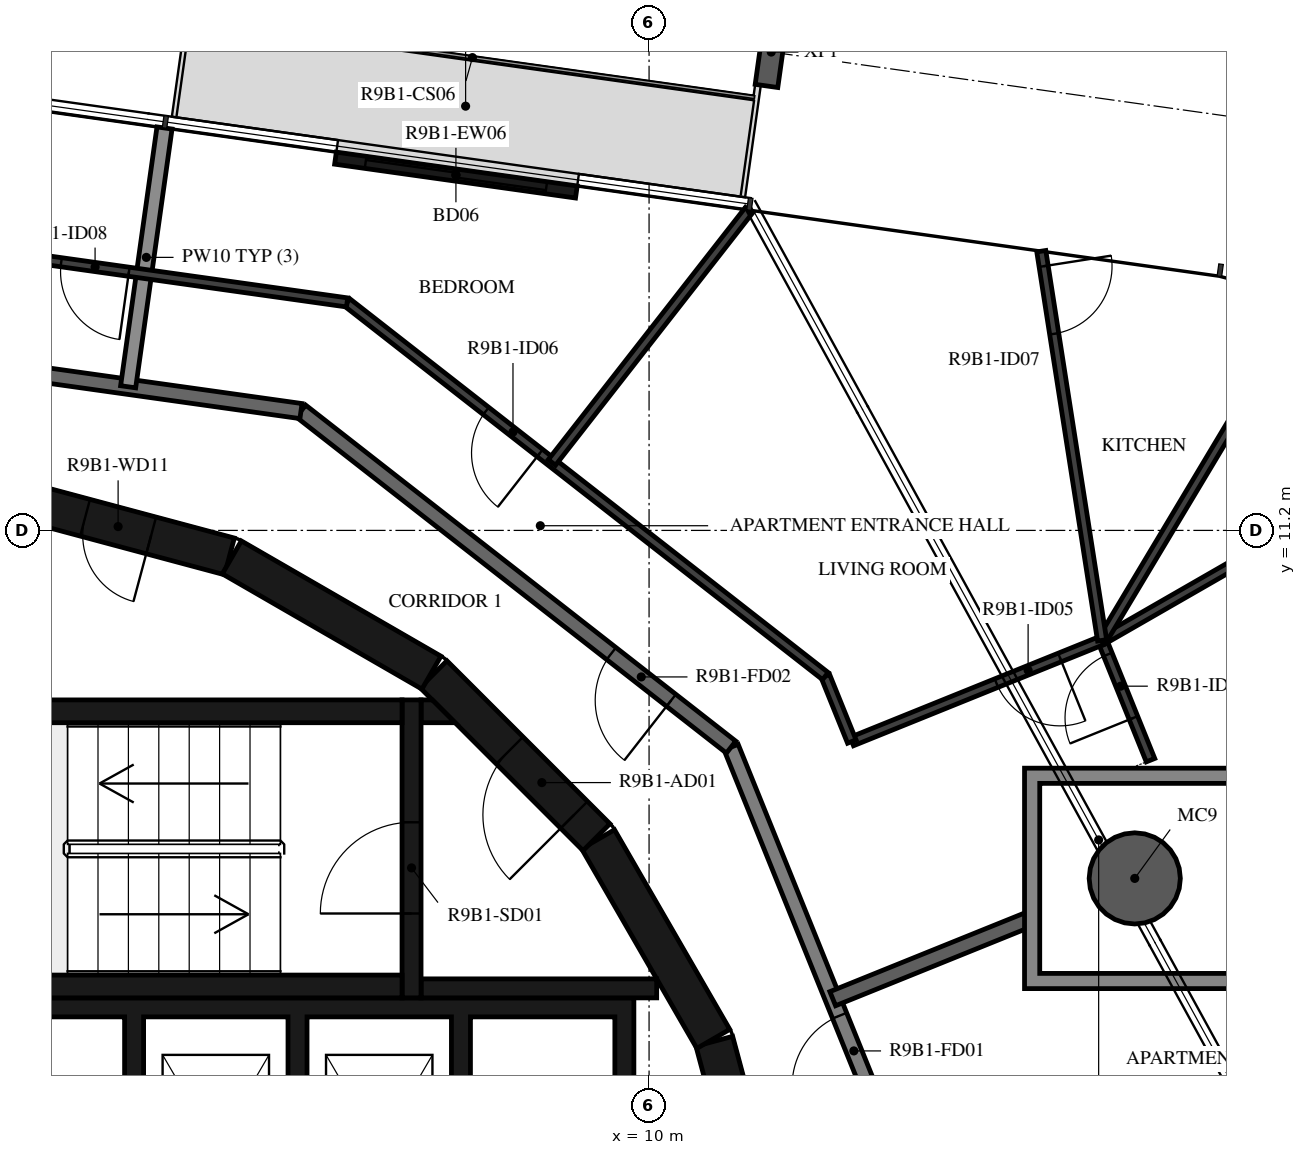
"""IFC4 building model, lengths in metres.
Left out: names, types, materials, properties, quantities, classifications, styles, units other than length and angle.
Written with IfcOpenShell. Run it as: python <this file> out.ifc"""

import sys

from ifc_helpers import new_model, si_unit, direction, frame, frame_2d, origin, origin_2d, place, context, subcontext, project, spatial, polyline, rectangle, hollow_circle, i_section, outline, extrude, element, fill, save


model = new_model("IFC4")
c1 = context("Model", 3, precision=1e-05, world=origin(), true_north=direction((0.0, 1.0)))
c2 = subcontext(c1, "Body", "Model", "MODEL_VIEW")
j1 = project(units=[si_unit("LENGTHUNIT", "METRE"), si_unit("PLANEANGLEUNIT", "RADIAN")], contexts=[c1])
p1 = place(None, origin())
s1 = spatial("IfcSite", under=j1, at=p1, CompositionType="ELEMENT")
p2 = place(p1, origin())
s2 = spatial("IfcBuilding", under=s1, at=p2, CompositionType="ELEMENT")
p3 = place(p2, frame((0.0, 0.0, 343.5)))
s3 = spatial("IfcBuildingStorey", under=s2, at=p3, CompositionType="ELEMENT", Elevation=343.5)
p4 = place(p3, frame((16.39, 6.622, -0.38), z_axis=(0.0, 0.0, 1.0), x_axis=(1.0, 0.0, 0.0)))
e1 = element("IfcColumn", 1, at=p4, inside=s3, PredefinedType="COLUMN", context=c2, shape_type="SweptSolid", body=[
    extrude(hollow_circle(Radius=0.6, WallThickness=0.03, at=origin_2d()), origin(), (0.0, 0.0, 1.0), 3.5),
])
p5 = place(p3, frame((11.607, 17.493, -0.38), z_axis=(0.0, 0.0, 1.0), x_axis=(0.990268081324, -0.139173011432, 0.0)))
e2 = element("IfcColumn", 2, at=p5, inside=s3, PredefinedType="COLUMN", context=c2, shape_type="SweptSolid", body=[
    extrude(i_section(OverallWidth=0.3, OverallDepth=0.9, WebThickness=0.019, FlangeThickness=0.035, FilletRadius=0.03, at=origin_2d()), origin(), (0.0, 0.0, 1.0), 3.5),
])
p6 = place(p3, frame((9.043, 15.652, 0.0), z_axis=(0.0, 0.0, 1.0), x_axis=(-0.990270382149, 0.139156639217, 0.0)))
e3 = element("IfcWall", 3, at=p6, inside=s3, PredefinedType="STANDARD", context=c2, shape_type="SweptSolid", body=[
    extrude(rectangle(XDim=3.2, YDim=0.16, at=frame_2d((1.6, 0.0))), origin(), (0.0, 0.0, 1.0), 3.12),
])
p7 = place(p6, frame((0.4, 0.0, 0.0)))
e4 = element("IfcOpeningElement", 4, at=p7, cuts=e3, PredefinedType="OPENING", context=c2, shape_type="SweptSolid", body=[
    extrude(rectangle(XDim=2.4, YDim=2.4, at=frame_2d((1.2, 1.2))), frame((0.0, 0.09, 0.0), z_axis=(0.0, -1.0, 0.0), x_axis=(1.0, 0.0, 0.0)), (0.0, 0.0, 1.0), 0.18),
])
for number, where, z_axis, x_axis in (
    (5, (11.643, 1.55, 0.0), (0.0, 0.0, 1.0), (-0.259, 0.966, 0.0)),
    (6, (10.845, 4.51, 0.0), (0.0, 0.0, 1.0), (-0.5, 0.866, 0.0)),
):
    element("IfcWall", number, at=place(p3, frame(where, z_axis=z_axis, x_axis=x_axis)), inside=s3, PredefinedType="SHEAR", context=c2, shape_type="SweptSolid", body=[
        extrude(rectangle(XDim=3.033, YDim=0.5, at=frame_2d((1.516, 0.0))), origin(), (0.0, 0.0, 1.0), 3.12),
    ])
p8 = place(p3, frame((9.308, 7.164, 0.0), z_axis=(0.0, 0.0, 1.0), x_axis=(-0.707106781187, 0.707106781187, 0.0)))
e7 = element("IfcWall", 7, at=p8, inside=s3, PredefinedType="SHEAR", context=c2, shape_type="SweptSolid", body=[
    extrude(rectangle(XDim=3.032, YDim=0.5, at=frame_2d((1.516, 0.0))), origin(), (0.0, 0.0, 1.0), 3.12),
])
p9 = place(p8, frame((0.416, 0.0, 0.0)))
e8 = element("IfcOpeningElement", 8, at=p9, cuts=e7, PredefinedType="OPENING", context=c2, shape_type="SweptSolid", body=[
    extrude(rectangle(XDim=1.2, YDim=2.1, at=frame_2d((0.6, 1.05))), frame((0.0, 0.26, 0.0), z_axis=(0.0, -1.0, 0.0), x_axis=(1.0, 0.0, 0.0)), (0.0, 0.0, 1.0), 0.52),
])
p10 = place(p3, frame((7.137, 9.329, 0.0), z_axis=(0.0, 0.0, 1.0), x_axis=(-0.865975092491, 0.500087131594, 0.0)))
e9 = element("IfcWall", 9, at=p10, inside=s3, PredefinedType="SHEAR", context=c2, shape_type="SweptSolid", body=[
    extrude(rectangle(XDim=3.033, YDim=0.5, at=frame_2d((1.516, 0.0))), origin(), (0.0, 0.0, 1.0), 3.12),
])
p11 = place(p3, frame((4.479, 10.858, 0.0), z_axis=(0.0, 0.0, 1.0), x_axis=(-0.965948410781, 0.258734743916, 0.0)))
e10 = element("IfcWall", 10, at=p11, inside=s3, PredefinedType="SHEAR", context=c2, shape_type="SweptSolid", body=[
    extrude(rectangle(XDim=3.033, YDim=0.5, at=frame_2d((1.516, 0.0))), origin(), (0.0, 0.0, 1.0), 3.12),
])
p12 = place(p11, frame((1.066, 0.0, 0.0)))
e11 = element("IfcOpeningElement", 11, at=p12, cuts=e10, PredefinedType="OPENING", context=c2, shape_type="SweptSolid", body=[
    extrude(rectangle(XDim=0.9, YDim=2.1, at=frame_2d((0.45, 1.05))), frame((0.0, 0.26, 0.0), z_axis=(0.0, -1.0, 0.0), x_axis=(1.0, 0.0, 0.0)), (0.0, 0.0, 1.0), 0.52),
])
for number, where, z_axis, x_axis in (
    (12, (0.0, 5.2, 0.0), (0.0, 0.0, 1.0), (1.0, 0.0, 0.0)),
    (13, (0.0, 8.82, 0.0), (0.0, 0.0, 1.0), (1.0, 0.0, 0.0)),
):
    element("IfcWall", number, at=place(p3, frame(where, z_axis=z_axis, x_axis=x_axis)), inside=s3, PredefinedType="SHEAR", context=c2, shape_type="SweptSolid", body=[
        extrude(rectangle(XDim=6.75, YDim=0.3, at=frame_2d((3.375, 0.0))), origin(), (0.0, 0.0, 1.0), 3.12),
    ])
p13 = place(p3, frame((6.875, 5.05, 0.0), z_axis=(0.0, 0.0, 1.0), x_axis=(0.0, 1.0, 0.0)))
e14 = element("IfcWall", 14, at=p13, inside=s3, PredefinedType="SHEAR", context=c2, shape_type="SweptSolid", body=[
    extrude(rectangle(XDim=3.92, YDim=0.25, at=frame_2d((1.96, 0.0))), origin(), (0.0, 0.0, 1.0), 3.12),
])
p14 = place(p13, frame((1.11, 0.0, 0.0)))
e15 = element("IfcOpeningElement", 15, at=p14, cuts=e14, PredefinedType="OPENING", context=c2, shape_type="SweptSolid", body=[
    extrude(rectangle(XDim=1.2, YDim=2.1, at=frame_2d((0.6, 1.05))), frame((0.0, 0.135, 0.0), z_axis=(0.0, -1.0, 0.0), x_axis=(1.0, 0.0, 0.0)), (0.0, 0.0, 1.0), 0.27),
])
p15 = place(p3, frame((7.0, 5.175, 0.0), z_axis=(0.0, 0.0, 1.0), x_axis=(1.0, 0.0, 0.0)))
e16 = element("IfcWall", 16, at=p15, inside=s3, PredefinedType="SHEAR", context=c2, shape_type="SweptSolid", body=[
    extrude(rectangle(XDim=3.1, YDim=0.25, at=frame_2d((1.55, 0.0))), origin(), (0.0, 0.0, 1.0), 3.12),
])
p16 = place(p3, origin())
e17 = element("IfcWall", 17, at=p16, inside=s3, PredefinedType="SHEAR", context=c2, shape_type="SweptSolid", body=[
    extrude(outline(polyline([(7.448, 8.67), (7.0, 8.67), (7.0, 8.97), (7.148, 8.97), (7.448, 8.67)])), origin(), (0.0, 0.0, 1.0), 3.12),
])
p17 = place(p3, origin())
e18 = element("IfcWall", 18, at=p17, inside=s3, PredefinedType="SHEAR", context=c2, shape_type="SweptSolid", body=[
    extrude(outline(polyline([(-9.8, 1.9), (-9.55, 1.9), (-9.55, 4.8), (-1.2, 4.8), (-1.2, 1.9), (-0.95, 1.9), (-0.95, 4.8), (3.1, 4.8), (3.1, 1.9), (3.35, 1.9), (3.35, 4.8), (5.25, 4.8), (5.25, 1.9), (5.5, 1.9), (5.5, 4.8), (7.4, 4.8), (7.4, 1.9), (7.65, 1.9), (7.65, 4.8), (9.55, 4.8), (9.55, 1.9), (9.8, 1.9), (9.8, 4.8), (9.8, 5.05), (-9.8, 5.05), (-9.8, 4.8), (-9.8, 1.9)])), origin(), (0.0, 0.0, 1.0), 3.12),
])
p18 = place(p3, frame((13.769, 1.691, 0.0), z_axis=(0.0, 0.0, 1.0), x_axis=(-0.374618189599, 0.92717916932, 0.0)))
e19 = element("IfcWall", 19, at=p18, inside=s3, PredefinedType="STANDARD", context=c2, shape_type="SweptSolid", body=[
    extrude(rectangle(XDim=7.181, YDim=0.2, at=frame_2d((3.591, 0.0))), origin(), (0.0, 0.0, 1.0), 3.12),
])
p19 = place(p18, frame((2.371, 0.0, 0.0)))
e20 = element("IfcOpeningElement", 20, at=p19, cuts=e19, PredefinedType="OPENING", context=c2, shape_type="SweptSolid", body=[
    extrude(rectangle(XDim=1.0, YDim=2.1, at=frame_2d((0.5, 1.05))), frame((0.0, 0.11, 0.0), z_axis=(0.0, -1.0, 0.0), x_axis=(1.0, 0.0, 0.0)), (0.0, 0.0, 1.0), 0.22),
])
p20 = place(p3, frame((11.079, 8.349, 0.0), z_axis=(0.0, 0.0, 1.0), x_axis=(-0.78800478687, 0.615669112324, 0.0)))
e21 = element("IfcWall", 21, at=p20, inside=s3, PredefinedType="STANDARD", context=c2, shape_type="SweptSolid", body=[
    extrude(rectangle(XDim=7.181, YDim=0.2, at=frame_2d((3.591, 0.0))), origin(), (0.0, 0.0, 1.0), 3.12),
])
p21 = place(p20, frame((1.0, 0.0, 0.0)))
e22 = element("IfcOpeningElement", 22, at=p21, cuts=e21, PredefinedType="OPENING", context=c2, shape_type="SweptSolid", body=[
    extrude(rectangle(XDim=1.0, YDim=2.1, at=frame_2d((0.5, 1.05))), frame((0.0, 0.11, 0.0), z_axis=(0.0, -1.0, 0.0), x_axis=(1.0, 0.0, 0.0)), (0.0, 0.0, 1.0), 0.22),
])
p22 = place(p3, frame((5.42, 12.77, 0.0), z_axis=(0.0, 0.0, 1.0), x_axis=(-0.990270565508, 0.139155334385, 0.0)))
e23 = element("IfcWall", 23, at=p22, inside=s3, PredefinedType="STANDARD", context=c2, shape_type="SweptSolid", body=[
    extrude(rectangle(XDim=7.181, YDim=0.2, at=frame_2d((3.59, 0.0))), origin(), (0.0, 0.0, 1.0), 3.12),
])
p23 = place(p3, frame((14.989, 6.079, 0.0), z_axis=(0.0, 0.0, 1.0), x_axis=(-0.927203056473, -0.374559063523, 0.0)))
e24 = element("IfcWall", 24, at=p23, inside=s3, PredefinedType="STANDARD", context=c2, shape_type="SweptSolid", body=[
    extrude(rectangle(XDim=2.775, YDim=0.2, at=frame_2d((1.387, 0.0))), origin(), (0.0, 0.0, 1.0), 3.12),
])
p24 = place(p3, frame((3.625, 16.494, 0.0), z_axis=(0.0, 0.0, 1.0), x_axis=(-0.139174320859, -0.990267897295, 0.0)))
e25 = element("IfcWall", 25, at=p24, inside=s3, PredefinedType="STANDARD", context=c2, shape_type="SweptSolid", body=[
    extrude(rectangle(XDim=3.438, YDim=0.2, at=frame_2d((1.719, 0.0))), origin(), (0.0, 0.0, 1.0), 2.73),
])
p25 = place(p3, frame((16.597, 8.177, 0.0), z_axis=(0.0, 0.0, 1.0), x_axis=(-0.374631609957, 0.927173746835, 0.0)))
e26 = element("IfcWall", 26, at=p25, inside=s3, PredefinedType="PARTITIONING", context=c2, shape_type="SweptSolid", body=[
    extrude(rectangle(XDim=1.7, YDim=0.12, at=frame_2d((0.85, 0.0))), origin(), (0.0, 0.0, 1.0), 3.12),
])
p26 = place(p25, frame((0.6, 0.0, 0.0)))
e27 = element("IfcOpeningElement", 27, at=p26, cuts=e26, PredefinedType="OPENING", context=c2, shape_type="SweptSolid", body=[
    extrude(rectangle(XDim=0.9, YDim=2.1, at=frame_2d((0.45, 1.05))), frame((0.0, 0.07, 0.0), z_axis=(0.0, -1.0, 0.0), x_axis=(1.0, 0.0, 0.0)), (0.0, 0.0, 1.0), 0.14),
])
p27 = place(p3, frame((15.96, 9.753, 0.0), z_axis=(0.0, 0.0, 1.0), x_axis=(-0.927148174805, -0.37469489182, 0.0)))
e28 = element("IfcWall", 28, at=p27, inside=s3, PredefinedType="PARTITIONING", context=c2, shape_type="SweptSolid", body=[
    extrude(rectangle(XDim=3.552, YDim=0.12, at=frame_2d((1.776, 0.0))), origin(), (0.0, 0.0, 1.0), 3.12),
])
p28 = place(p27, frame((0.6, 0.0, 0.0)))
e29 = element("IfcOpeningElement", 29, at=p28, cuts=e28, PredefinedType="OPENING", context=c2, shape_type="SweptSolid", body=[
    extrude(rectangle(XDim=0.9, YDim=2.1, at=frame_2d((0.45, 1.05))), frame((0.0, 0.07, 0.0), z_axis=(0.0, -1.0, 0.0), x_axis=(1.0, 0.0, 0.0)), (0.0, 0.0, 1.0), 0.14),
])
p29 = place(p3, frame((12.667, 8.423, 0.0), z_axis=(0.0, 0.0, 1.0), x_axis=(-0.374697807675, 0.927146996395, 0.0)))
e30 = element("IfcWall", 30, at=p29, inside=s3, PredefinedType="PARTITIONING", context=c2, shape_type="SweptSolid", body=[
    extrude(rectangle(XDim=0.928, YDim=0.12, at=frame_2d((0.464, 0.0))), origin(), (0.0, 0.0, 1.0), 3.12),
])
p30 = place(p3, frame((12.319, 9.283, 0.0), z_axis=(0.0, 0.0, 1.0), x_axis=(-0.788000268464, 0.61567489546, 0.0)))
e31 = element("IfcWall", 31, at=p30, inside=s3, PredefinedType="PARTITIONING", context=c2, shape_type="SweptSolid", body=[
    extrude(rectangle(XDim=7.985, YDim=0.12, at=frame_2d((3.992, 0.0))), origin(), (0.0, 0.0, 1.0), 3.12),
])
p31 = place(p30, frame((4.765, 0.0, 0.0)))
e32 = element("IfcOpeningElement", 32, at=p31, cuts=e31, PredefinedType="OPENING", context=c2, shape_type="SweptSolid", body=[
    extrude(rectangle(XDim=0.9, YDim=2.1, at=frame_2d((0.45, 1.05))), frame((0.0, 0.07, 0.0), z_axis=(0.0, -1.0, 0.0), x_axis=(1.0, 0.0, 0.0)), (0.0, 0.0, 1.0), 0.14),
])
p32 = place(p3, frame((6.027, 14.199, 0.0), z_axis=(0.0, 0.0, 1.0), x_axis=(-0.990271593532, 0.139148018469, 0.0)))
e33 = element("IfcWall", 33, at=p32, inside=s3, PredefinedType="PARTITIONING", context=c2, shape_type="SweptSolid", body=[
    extrude(rectangle(XDim=7.985, YDim=0.12, at=frame_2d((3.992, 0.0))), origin(), (0.0, 0.0, 1.0), 3.12),
])
p33 = place(p32, frame((2.898, 0.0, 0.0)))
e34 = element("IfcOpeningElement", 34, at=p33, cuts=e33, PredefinedType="OPENING", context=c2, shape_type="SweptSolid", body=[
    extrude(rectangle(XDim=0.9, YDim=2.1, at=frame_2d((0.45, 1.05))), frame((0.0, 0.07, 0.0), z_axis=(0.0, -1.0, 0.0), x_axis=(1.0, 0.0, 0.0)), (0.0, 0.0, 1.0), 0.14),
])
p34 = place(p3, frame((21.343, 12.847, 0.0), z_axis=(0.0, 0.0, 1.0), x_axis=(-0.866974691568, -0.498352168832, 0.0)))
e35 = element("IfcWall", 35, at=p34, inside=s3, PredefinedType="PARTITIONING", context=c2, shape_type="SweptSolid", body=[
    extrude(rectangle(XDim=6.208, YDim=0.12, at=frame_2d((3.104, 0.0))), origin(), (0.0, 0.0, 1.0), 3.12),
])
p35 = place(p3, frame((18.649, 14.244, 0.0), z_axis=(0.0, 0.0, 1.0), x_axis=(-0.513782200586, -0.85792065505, 0.0)))
e36 = element("IfcWall", 36, at=p35, inside=s3, PredefinedType="PARTITIONING", context=c2, shape_type="SweptSolid", body=[
    extrude(rectangle(XDim=5.234, YDim=0.12, at=frame_2d((2.617, 0.0))), origin(), (0.0, 0.0, 1.0), 3.12),
])
p36 = place(p35, frame((0.2, 0.0, 0.0)))
e37 = element("IfcOpeningElement", 37, at=p36, cuts=e36, PredefinedType="OPENING", context=c2, shape_type="SweptSolid", body=[
    extrude(rectangle(XDim=0.8, YDim=2.1, at=frame_2d((0.4, 1.05))), frame((0.0, 0.07, 0.0), z_axis=(0.0, -1.0, 0.0), x_axis=(1.0, 0.0, 0.0)), (0.0, 0.0, 1.0), 0.14),
])
p37 = place(p3, frame((15.16, 14.873, 0.0), z_axis=(0.0, 0.0, 1.0), x_axis=(0.154389815045, -0.988010012606, 0.0)))
e38 = element("IfcWall", 38, at=p37, inside=s3, PredefinedType="PARTITIONING", context=c2, shape_type="SweptSolid", body=[
    extrude(rectangle(XDim=5.182, YDim=0.12, at=frame_2d((2.591, 0.0))), origin(), (0.0, 0.0, 1.0), 3.12),
])
p38 = place(p37, frame((0.2, 0.0, 0.0)))
e39 = element("IfcOpeningElement", 39, at=p38, cuts=e38, PredefinedType="OPENING", context=c2, shape_type="SweptSolid", body=[
    extrude(rectangle(XDim=0.9, YDim=2.1, at=frame_2d((0.45, 1.05))), frame((0.0, 0.07, 0.0), z_axis=(0.0, -1.0, 0.0), x_axis=(1.0, 0.0, 0.0)), (0.0, 0.0, 1.0), 0.14),
])
p39 = place(p3, frame((11.315, 15.414, 0.0), z_axis=(0.0, 0.0, 1.0), x_axis=(-0.615656413137, -0.788014708596, 0.0)))
e40 = element("IfcWall", 40, at=p39, inside=s3, PredefinedType="PARTITIONING", context=c2, shape_type="SweptSolid", body=[
    extrude(rectangle(XDim=4.213, YDim=0.12, at=frame_2d((2.106, 0.0))), origin(), (0.0, 0.0, 1.0), 3.12),
])
p40 = place(p3, origin())
e41 = element("IfcWall", 41, at=p40, inside=s3, PredefinedType="STANDARD", context=c2, shape_type="SweptSolid", body=[
    extrude(outline(polyline([(17.84, 8.072), (17.84, 5.172), (14.94, 5.172), (14.94, 8.072), (17.84, 8.072)]), holes=[polyline([(15.14, 5.372), (17.64, 5.372), (17.64, 7.872), (15.14, 7.872), (15.14, 5.372)])]), origin(), (0.0, 0.0, 1.0), 3.12),
])
p41 = place(p7, origin())
e42 = element("IfcDoor", 42, at=p41, inside=s3, OperationType="DOUBLE_DOOR_SLIDING", PredefinedType="DOOR", context=c2, shape_type="SweptSolid", body=[
    extrude(rectangle(XDim=2.4, YDim=2.4, at=frame_2d((1.2, 1.2))), frame((0.0, 0.025, 0.0), z_axis=(0.0, -1.0, 0.0), x_axis=(1.0, 0.0, 0.0)), (0.0, 0.0, 1.0), 0.05),
])
fill(e4, e42)
p42 = place(p14, origin())
e43 = element("IfcDoor", 43, at=p42, inside=s3, OperationType="SINGLE_SWING_LEFT", PredefinedType="DOOR", context=c2, shape_type="SweptSolid", body=[
    extrude(rectangle(XDim=1.2, YDim=2.1, at=frame_2d((0.6, 1.05))), frame((0.0, 0.025, 0.0), z_axis=(0.0, -1.0, 0.0), x_axis=(1.0, 0.0, 0.0)), (0.0, 0.0, 1.0), 0.05),
])
fill(e15, e43)
p43 = place(p9, origin())
e44 = element("IfcDoor", 44, at=p43, inside=s3, OperationType="SINGLE_SWING_RIGHT", PredefinedType="DOOR", context=c2, shape_type="SweptSolid", body=[
    extrude(rectangle(XDim=1.2, YDim=2.1, at=frame_2d((0.6, 1.05))), frame((0.0, 0.025, 0.0), z_axis=(0.0, -1.0, 0.0), x_axis=(1.0, 0.0, 0.0)), (0.0, 0.0, 1.0), 0.05),
])
fill(e8, e44)
p44 = place(p12, origin())
e45 = element("IfcDoor", 45, at=p44, inside=s3, OperationType="SINGLE_SWING_LEFT", PredefinedType="DOOR", context=c2, shape_type="SweptSolid", body=[
    extrude(rectangle(XDim=0.9, YDim=2.1, at=frame_2d((0.45, 1.05))), frame((0.0, 0.025, 0.0), z_axis=(0.0, -1.0, 0.0), x_axis=(1.0, 0.0, 0.0)), (0.0, 0.0, 1.0), 0.05),
])
fill(e11, e45)
p45 = place(p19, origin())
e46 = element("IfcDoor", 46, at=p45, inside=s3, OperationType="SINGLE_SWING_LEFT", PredefinedType="DOOR", context=c2, shape_type="SweptSolid", body=[
    extrude(rectangle(XDim=1.0, YDim=2.1, at=frame_2d((0.5, 1.05))), frame((0.0, 0.025, 0.0), z_axis=(0.0, -1.0, 0.0), x_axis=(1.0, 0.0, 0.0)), (0.0, 0.0, 1.0), 0.05),
])
fill(e20, e46)
p46 = place(p21, origin())
e47 = element("IfcDoor", 47, at=p46, inside=s3, OperationType="SINGLE_SWING_LEFT", PredefinedType="DOOR", context=c2, shape_type="SweptSolid", body=[
    extrude(rectangle(XDim=1.0, YDim=2.1, at=frame_2d((0.5, 1.05))), frame((0.0, 0.025, 0.0), z_axis=(0.0, -1.0, 0.0), x_axis=(1.0, 0.0, 0.0)), (0.0, 0.0, 1.0), 0.05),
])
fill(e22, e47)
p47 = place(p26, origin())
e48 = element("IfcDoor", 48, at=p47, inside=s3, OperationType="SINGLE_SWING_LEFT", PredefinedType="DOOR", context=c2, shape_type="SweptSolid", body=[
    extrude(rectangle(XDim=0.9, YDim=2.1, at=frame_2d((0.45, 1.05))), frame((0.0, 0.025, 0.0), z_axis=(0.0, -1.0, 0.0), x_axis=(1.0, 0.0, 0.0)), (0.0, 0.0, 1.0), 0.05),
])
fill(e27, e48)
p48 = place(p28, origin())
e49 = element("IfcDoor", 49, at=p48, inside=s3, OperationType="SINGLE_SWING_RIGHT", PredefinedType="DOOR", context=c2, shape_type="SweptSolid", body=[
    extrude(rectangle(XDim=0.9, YDim=2.1, at=frame_2d((0.45, 1.05))), frame((0.0, 0.025, 0.0), z_axis=(0.0, -1.0, 0.0), x_axis=(1.0, 0.0, 0.0)), (0.0, 0.0, 1.0), 0.05),
])
fill(e29, e49)
p49 = place(p31, origin())
e50 = element("IfcDoor", 50, at=p49, inside=s3, OperationType="SINGLE_SWING_LEFT", PredefinedType="DOOR", context=c2, shape_type="SweptSolid", body=[
    extrude(rectangle(XDim=0.9, YDim=2.1, at=frame_2d((0.45, 1.05))), frame((0.0, 0.025, 0.0), z_axis=(0.0, -1.0, 0.0), x_axis=(1.0, 0.0, 0.0)), (0.0, 0.0, 1.0), 0.05),
])
fill(e32, e50)
p50 = place(p38, origin())
e51 = element("IfcDoor", 51, at=p50, inside=s3, OperationType="SINGLE_SWING_LEFT", PredefinedType="DOOR", context=c2, shape_type="SweptSolid", body=[
    extrude(rectangle(XDim=0.9, YDim=2.1, at=frame_2d((0.45, 1.05))), frame((0.0, 0.025, 0.0), z_axis=(0.0, -1.0, 0.0), x_axis=(1.0, 0.0, 0.0)), (0.0, 0.0, 1.0), 0.05),
])
fill(e39, e51)
p51 = place(p33, origin())
e52 = element("IfcDoor", 52, at=p51, inside=s3, OperationType="SINGLE_SWING_LEFT", PredefinedType="DOOR", context=c2, shape_type="SweptSolid", body=[
    extrude(rectangle(XDim=0.9, YDim=2.1, at=frame_2d((0.45, 1.05))), frame((0.0, 0.025, 0.0), z_axis=(0.0, -1.0, 0.0), x_axis=(1.0, 0.0, 0.0)), (0.0, 0.0, 1.0), 0.05),
])
fill(e34, e52)
save(model, sys.argv[1])
